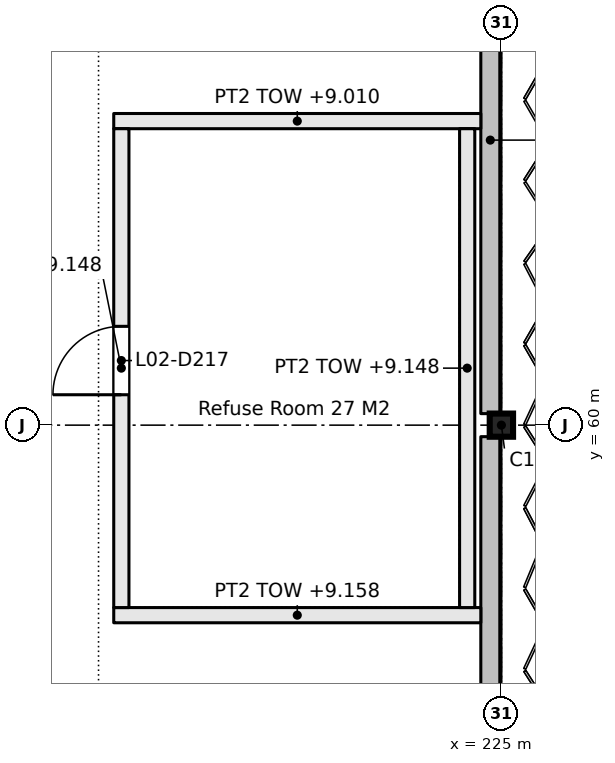
"""IFC4 building model, lengths in metres.
Left out: names, types, materials, properties, quantities, classifications, styles, units other than length and angle.
Written with IfcOpenShell. Run it as: python <this file> out.ifc"""

import sys

from ifc_helpers import new_model, si_unit, direction, frame, frame_2d, origin, origin_2d, place, context, subcontext, project, spatial, rectangle, i_section, extrude, element, fill, save


model = new_model("IFC4")
c1 = context("Model", 3, precision=1e-05, world=origin(), true_north=direction((0.0, 1.0)))
c2 = subcontext(c1, "Body", "Model", "MODEL_VIEW")
j1 = project(units=[si_unit("LENGTHUNIT", "METRE"), si_unit("PLANEANGLEUNIT", "RADIAN")], contexts=[c1])
p1 = place(None, origin())
s1 = spatial("IfcSite", under=j1, at=p1, CompositionType="ELEMENT")
p2 = place(p1, origin())
s2 = spatial("IfcBuilding", under=s1, at=p2, CompositionType="ELEMENT")
p3 = place(p2, frame((0.0, 0.0, 6.6)))
s3 = spatial("IfcBuildingStorey", under=s2, at=p3, CompositionType="ELEMENT", Elevation=6.6)
p4 = place(p3, frame((225.0, 60.0, 0.0), z_axis=(0.0, 0.0, 1.0), x_axis=(0.0, 1.0, 0.0)))
e1 = element("IfcColumn", 1, at=p4, inside=s3, PredefinedType="COLUMN", context=c2, shape_type="SweptSolid", body=[
    extrude(i_section(OverallWidth=0.305, OverallDepth=0.307, WebThickness=0.01, FlangeThickness=0.015, FilletRadius=0.015, at=origin_2d()), origin(), (0.0, 0.0, 1.0), 3.3),
])
p5 = place(p3, frame((219.9, 57.5, 0.0), z_axis=(0.0, 0.0, 1.0), x_axis=(1.0, 0.0, 0.0)))
e2 = element("IfcWall", 2, at=p5, inside=s3, PredefinedType="PARTITIONING", context=c2, shape_type="SweptSolid", body=[
    extrude(rectangle(XDim=4.829, YDim=0.2, at=frame_2d((2.415, 0.0))), origin(), (0.0, 0.0, 1.0), 2.558),
])
p6 = place(p3, frame((219.9, 64.0, 0.0), z_axis=(0.0, 0.0, 1.0), x_axis=(1.0, 0.0, 0.0)))
e3 = element("IfcWall", 3, at=p6, inside=s3, PredefinedType="PARTITIONING", context=c2, shape_type="SweptSolid", body=[
    extrude(rectangle(XDim=4.829, YDim=0.2, at=frame_2d((2.415, 0.0))), origin(), (0.0, 0.0, 1.0), 2.41),
])
p7 = place(p3, frame((220.0, 57.6, 0.0), z_axis=(0.0, 0.0, 1.0), x_axis=(0.0, 1.0, 0.0)))
e4 = element("IfcWall", 4, at=p7, inside=s3, PredefinedType="PARTITIONING", context=c2, shape_type="SweptSolid", body=[
    extrude(rectangle(XDim=6.3, YDim=0.2, at=frame_2d((3.15, 0.0))), origin(), (0.0, 0.0, 1.0), 2.548),
])
p8 = place(p7, frame((2.8, 0.0, 0.0)))
e5 = element("IfcOpeningElement", 5, at=p8, cuts=e4, PredefinedType="OPENING", context=c2, shape_type="SweptSolid", body=[
    extrude(rectangle(XDim=0.9, YDim=2.1, at=frame_2d((0.45, 1.05))), frame((0.0, 0.11, 0.0), z_axis=(0.0, -1.0, 0.0), x_axis=(1.0, 0.0, 0.0)), (0.0, 0.0, 1.0), 0.22),
])
p9 = place(p3, frame((224.55, 57.6, 0.0), z_axis=(0.0, 0.0, 1.0), x_axis=(0.0, 1.0, 0.0)))
e6 = element("IfcWall", 6, at=p9, inside=s3, PredefinedType="PARTITIONING", context=c2, shape_type="SweptSolid", body=[
    extrude(rectangle(XDim=6.3, YDim=0.2, at=frame_2d((3.15, 0.0))), origin(), (0.0, 0.0, 1.0), 2.548),
])
for number, where, z_axis, x_axis in (
    (7, (224.854, 52.652, 0.0), (0.0, 0.0, 1.0), (0.0, 1.0, 0.0)),
    (8, (224.854, 60.152, 0.0), (0.0, 0.0, 1.0), (0.0, 1.0, 0.0)),
):
    element("IfcWall", number, at=place(p3, frame(where, z_axis=z_axis, x_axis=x_axis)), inside=s3, PredefinedType="SOLIDWALL", context=c2, shape_type="SweptSolid", body=[
        extrude(rectangle(XDim=7.197, YDim=0.25, at=frame_2d((3.598, 0.0))), origin(), (0.0, 0.0, 1.0), 1.1),
    ])
p10 = place(p8, origin())
e9 = element("IfcDoor", 9, at=p10, inside=s3, OperationType="SINGLE_SWING_RIGHT", PredefinedType="DOOR", context=c2, shape_type="SweptSolid", body=[
    extrude(rectangle(XDim=0.9, YDim=2.1, at=frame_2d((0.45, 1.05))), frame((0.0, 0.025, 0.0), z_axis=(0.0, -1.0, 0.0), x_axis=(1.0, 0.0, 0.0)), (0.0, 0.0, 1.0), 0.05),
])
fill(e5, e9)
save(model, sys.argv[1])
